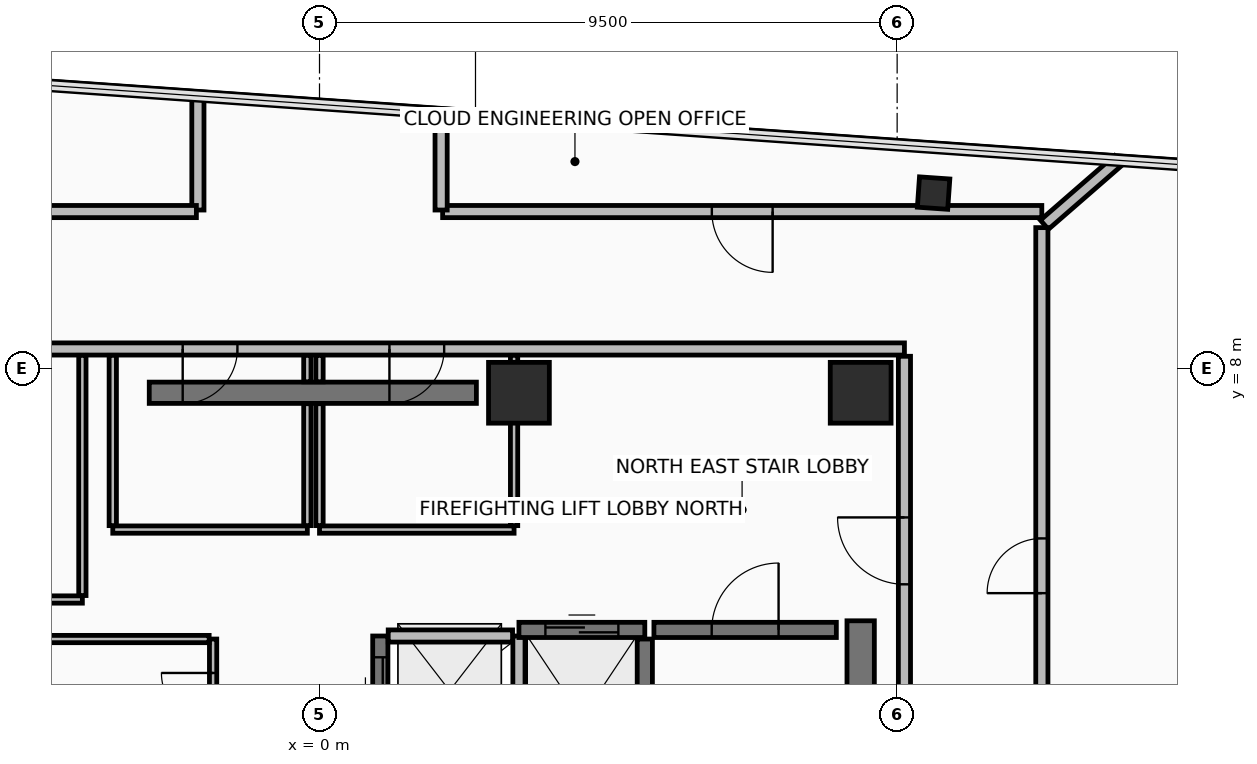
"""IFC4 building model, lengths in metres.
Left out: names, types, materials, properties, quantities, classifications, styles, units other than length and angle.
Written with IfcOpenShell. Run it as: python <this file> out.ifc"""

import sys

from ifc_helpers import new_model, si_unit, direction, frame, frame_2d, origin, origin_2d, place, context, subcontext, project, spatial, rectangle, hollow_rectangle, extrude, element, fill, save


model = new_model("IFC4")
c1 = context("Model", 3, precision=1e-05, world=origin(), true_north=direction((0.0, 1.0)))
c2 = subcontext(c1, "Body", "Model", "MODEL_VIEW")
j1 = project(units=[si_unit("LENGTHUNIT", "METRE"), si_unit("PLANEANGLEUNIT", "RADIAN")], contexts=[c1])
p1 = place(None, origin())
s1 = spatial("IfcSite", under=j1, at=p1, CompositionType="ELEMENT")
p2 = place(p1, origin())
s2 = spatial("IfcBuilding", under=s1, at=p2, CompositionType="ELEMENT")
p3 = place(p2, frame((0.0, 0.0, 248.65)))
s3 = spatial("IfcBuildingStorey", under=s2, at=p3, CompositionType="ELEMENT", Elevation=248.65)
for number, where, z_axis, x_axis in (
    (1, (8.9, 7.6, 0.0), (0.0, 0.0, 1.0), (1.0, 0.0, 0.0)),
    (2, (3.28, 7.6, 0.0), (0.0, 0.0, 1.0), (1.0, 0.0, 0.0)),
):
    element("IfcColumn", number, at=place(p3, frame(where, z_axis=z_axis, x_axis=x_axis)), inside=s3, PredefinedType="COLUMN", context=c2, shape_type="SweptSolid", body=[
        extrude(rectangle(XDim=1.0, YDim=1.0, at=origin_2d()), origin(), (0.0, 0.0, 1.0), 4.75),
    ])
p4 = place(p3, frame((10.1, 10.884, 0.0), z_axis=(0.0, 0.0, 1.0), x_axis=(-0.99756405026, 0.069756473744, 0.0)))
e3 = element("IfcColumn", 3, at=p4, inside=s3, PredefinedType="COLUMN", context=c2, shape_type="SweptSolid", body=[
    extrude(hollow_rectangle(XDim=0.5, YDim=0.5, WallThickness=0.032, at=origin_2d()), origin(), (0.0, 0.0, 1.0), 4.75),
])
p5 = place(p3, frame((-2.8, 7.6, 0.0), z_axis=(0.0, 0.0, 1.0), x_axis=(1.0, 0.0, 0.0)))
e4 = element("IfcWall", 4, at=p5, inside=s3, PredefinedType="SHEAR", context=c2, shape_type="SweptSolid", body=[
    extrude(rectangle(XDim=5.38, YDim=0.35, at=frame_2d((2.69, 0.0))), origin(), (0.0, 0.0, 1.0), 4.56),
])
p6 = place(p3, frame((8.9, -6.85, 0.0), z_axis=(0.0, 0.0, 1.0), x_axis=(0.0, 1.0, 0.0)))
e5 = element("IfcWall", 5, at=p6, inside=s3, PredefinedType="SHEAR", context=c2, shape_type="SweptSolid", body=[
    extrude(rectangle(XDim=10.7, YDim=0.45, at=frame_2d((5.35, 0.0))), origin(), (0.0, 0.0, 1.0), 4.56),
])
p7 = place(p3, frame((9.62, 8.32, 0.0), z_axis=(0.0, 0.0, 1.0), x_axis=(-1.0, 0.0, 0.0)))
e6 = element("IfcWall", 6, at=p7, inside=s3, PredefinedType="PARTITIONING", context=c2, shape_type="SweptSolid", body=[
    extrude(rectangle(XDim=19.24, YDim=0.2, at=frame_2d((9.62, 0.0))), origin(), (0.0, 0.0, 1.0), 2.755),
])
p8 = place(p7, frame((10.97, 0.0, 0.0)))
e7 = element("IfcOpeningElement", 7, at=p8, cuts=e6, PredefinedType="OPENING", context=c2, shape_type="SweptSolid", body=[
    extrude(rectangle(XDim=0.9, YDim=2.1, at=frame_2d((0.45, 1.05))), frame((0.0, 0.11, 0.0), z_axis=(0.0, -1.0, 0.0), x_axis=(1.0, 0.0, 0.0)), (0.0, 0.0, 1.0), 0.22),
])
p9 = place(p7, frame((7.57, 0.0, 0.0)))
e8 = element("IfcOpeningElement", 8, at=p9, cuts=e6, PredefinedType="OPENING", context=c2, shape_type="SweptSolid", body=[
    extrude(rectangle(XDim=0.9, YDim=2.1, at=frame_2d((0.45, 1.05))), frame((0.0, 0.11, 0.0), z_axis=(0.0, -1.0, 0.0), x_axis=(1.0, 0.0, 0.0)), (0.0, 0.0, 1.0), 0.22),
])
p10 = place(p7, frame((16.245, 0.0, 0.0)))
e9 = element("IfcOpeningElement", 9, at=p10, cuts=e6, PredefinedType="OPENING", context=c2, shape_type="SweptSolid", body=[
    extrude(rectangle(XDim=0.9, YDim=2.1, at=frame_2d((0.45, 1.05))), frame((0.0, 0.11, 0.0), z_axis=(0.0, -1.0, 0.0), x_axis=(1.0, 0.0, 0.0)), (0.0, 0.0, 1.0), 0.22),
])
p11 = place(p7, frame((14.295, 0.0, 0.0)))
e10 = element("IfcOpeningElement", 10, at=p11, cuts=e6, PredefinedType="OPENING", context=c2, shape_type="SweptSolid", body=[
    extrude(rectangle(XDim=0.9, YDim=2.1, at=frame_2d((0.45, 1.05))), frame((0.0, 0.11, 0.0), z_axis=(0.0, -1.0, 0.0), x_axis=(1.0, 0.0, 0.0)), (0.0, 0.0, 1.0), 0.22),
])
p12 = place(p3, frame((9.62, -8.2, 0.0), z_axis=(0.0, 0.0, 1.0), x_axis=(0.0, 1.0, 0.0)))
e11 = element("IfcWall", 11, at=p12, inside=s3, PredefinedType="PARTITIONING", context=c2, shape_type="SweptSolid", body=[
    extrude(rectangle(XDim=16.4, YDim=0.2, at=frame_2d((8.2, 0.0))), origin(), (0.0, 0.0, 1.0), 2.355),
])
p13 = place(p12, frame((12.65, 0.0, 0.0)))
e12 = element("IfcOpeningElement", 12, at=p13, cuts=e11, PredefinedType="OPENING", context=c2, shape_type="SweptSolid", body=[
    extrude(rectangle(XDim=1.1, YDim=2.15, at=frame_2d((0.55, 1.075))), frame((0.0, 0.11, 0.0), z_axis=(0.0, -1.0, 0.0), x_axis=(1.0, 0.0, 0.0)), (0.0, 0.0, 1.0), 0.22),
])
p14 = place(p3, frame((5.35, -3.75, 0.0), z_axis=(0.0, 0.0, 1.0), x_axis=(0.0, 1.0, 0.0)))
e13 = element("IfcWall", 13, at=p14, inside=s3, PredefinedType="SHEAR", context=c2, shape_type="SweptSolid", body=[
    extrude(rectangle(XDim=7.3, YDim=0.25, at=frame_2d((3.65, 0.0))), origin(), (0.0, 0.0, 1.0), 4.56),
])
p15 = place(p3, frame((5.5, 3.7, 0.0), z_axis=(0.0, 0.0, 1.0), x_axis=(1.0, 0.0, 0.0)))
e14 = element("IfcWall", 14, at=p15, inside=s3, PredefinedType="SHEAR", context=c2, shape_type="SweptSolid", body=[
    extrude(rectangle(XDim=3.0, YDim=0.25, at=frame_2d((1.5, 0.0))), origin(), (0.0, 0.0, 1.0), 4.56),
])
p16 = place(p15, frame((0.95, 0.0, 0.0)))
e15 = element("IfcOpeningElement", 15, at=p16, cuts=e14, PredefinedType="OPENING", context=c2, shape_type="SweptSolid", body=[
    extrude(rectangle(XDim=1.1, YDim=2.15, at=frame_2d((0.55, 1.075))), frame((0.0, 0.135, 0.0), z_axis=(0.0, -1.0, 0.0), x_axis=(1.0, 0.0, 0.0)), (0.0, 0.0, 1.0), 0.27),
])
p17 = place(p3, frame((1.0, 1.8, 0.0), z_axis=(0.0, 0.0, 1.0), x_axis=(0.0, 1.0, 0.0)))
e16 = element("IfcWall", 16, at=p17, inside=s3, PredefinedType="SHEAR", context=c2, shape_type="SweptSolid", body=[
    extrude(rectangle(XDim=1.8, YDim=0.25, at=frame_2d((0.9, 0.0))), origin(), (0.0, 0.0, 1.0), 4.56),
])
p18 = place(p17, frame((0.35, 0.0, 0.0)))
e17 = element("IfcOpeningElement", 17, at=p18, cuts=e16, PredefinedType="OPENING", context=c2, shape_type="SweptSolid", body=[
    extrude(rectangle(XDim=1.1, YDim=2.2, at=frame_2d((0.55, 1.1))), frame((0.0, 0.135, 0.0), z_axis=(0.0, -1.0, 0.0), x_axis=(1.0, 0.0, 0.0)), (0.0, 0.0, 1.0), 0.27),
])
p19 = place(p3, frame((3.28, 1.8, 0.0), z_axis=(0.0, 0.0, 1.0), x_axis=(0.0, 1.0, 0.0)))
e18 = element("IfcWall", 18, at=p19, inside=s3, PredefinedType="PARTITIONING", context=c2, shape_type="SweptSolid", body=[
    extrude(rectangle(XDim=1.8, YDim=0.2, at=frame_2d((0.9, 0.0))), origin(), (0.0, 0.0, 1.0), 4.56),
])
p20 = place(p3, frame((1.13, 3.6, 0.0), z_axis=(0.0, 0.0, 1.0), x_axis=(1.0, 0.0, 0.0)))
e19 = element("IfcWall", 19, at=p20, inside=s3, PredefinedType="PARTITIONING", context=c2, shape_type="SweptSolid", body=[
    extrude(rectangle(XDim=2.045, YDim=0.2, at=frame_2d((1.022, 0.0))), origin(), (0.0, 0.0, 1.0), 3.855),
])
p21 = place(p3, frame((3.28, 3.7, 0.0), z_axis=(0.0, 0.0, 1.0), x_axis=(1.0, 0.0, 0.0)))
e20 = element("IfcWall", 20, at=p21, inside=s3, PredefinedType="SHEAR", context=c2, shape_type="SweptSolid", body=[
    extrude(rectangle(XDim=2.07, YDim=0.25, at=frame_2d((1.035, 0.0))), origin(), (0.0, 0.0, 1.0), 4.56),
])
p22 = place(p21, frame((0.435, 0.0, 0.0)))
e21 = element("IfcOpeningElement", 21, at=p22, cuts=e20, PredefinedType="OPENING", context=c2, shape_type="SweptSolid", body=[
    extrude(rectangle(XDim=1.2, YDim=2.2, at=frame_2d((0.6, 1.1))), frame((0.0, 0.135, 0.0), z_axis=(0.0, -1.0, 0.0), x_axis=(1.0, 0.0, 0.0)), (0.0, 0.0, 1.0), 0.27),
])
p23 = place(p3, frame((-1.75, 1.585, 0.0), z_axis=(0.0, 0.0, 1.0), x_axis=(0.0, 1.0, 0.0)))
e22 = element("IfcWall", 22, at=p23, inside=s3, PredefinedType="PARTITIONING", context=c2, shape_type="SweptSolid", body=[
    extrude(rectangle(XDim=1.965, YDim=0.12, at=frame_2d((0.982, 0.0))), origin(), (0.0, 0.0, 1.0), 4.56),
])
p24 = place(p23, frame((0.557, 0.0, 0.0)))
e23 = element("IfcOpeningElement", 23, at=p24, cuts=e22, PredefinedType="OPENING", context=c2, shape_type="SweptSolid", body=[
    extrude(rectangle(XDim=0.85, YDim=2.1, at=frame_2d((0.425, 1.05))), frame((0.0, 0.07, 0.0), z_axis=(0.0, -1.0, 0.0), x_axis=(1.0, 0.0, 0.0)), (0.0, 0.0, 1.0), 0.14),
])
p25 = place(p3, frame((-1.815, 3.55, 0.0), z_axis=(0.0, 0.0, 1.0), x_axis=(-1.0, 0.0, 0.0)))
e24 = element("IfcWall", 24, at=p25, inside=s3, PredefinedType="PARTITIONING", context=c2, shape_type="SweptSolid", body=[
    extrude(rectangle(XDim=3.405, YDim=0.12, at=frame_2d((1.703, 0.0))), origin(), (0.0, 0.0, 1.0), 4.56),
])
p26 = place(p3, frame((-3.4, 5.35, 0.0), z_axis=(0.0, 0.0, 1.0), x_axis=(1.0, 0.0, 0.0)))
e25 = element("IfcWall", 25, at=p26, inside=s3, PredefinedType="PARTITIONING", context=c2, shape_type="SweptSolid", body=[
    extrude(rectangle(XDim=3.2, YDim=0.12, at=frame_2d((1.6, 0.0))), origin(), (0.0, 0.0, 1.0), 4.56),
])
p27 = place(p3, frame((-0.2, 5.415, 0.0), z_axis=(0.0, 0.0, 1.0), x_axis=(0.0, 1.0, 0.0)))
e26 = element("IfcWall", 26, at=p27, inside=s3, PredefinedType="PARTITIONING", context=c2, shape_type="SweptSolid", body=[
    extrude(rectangle(XDim=2.005, YDim=0.12, at=frame_2d((1.002, 0.0))), origin(), (0.0, 0.0, 1.0), 3.855),
])
p28 = place(p3, frame((-0.2, 7.78, 0.0), z_axis=(0.0, 0.0, 1.0), x_axis=(0.0, 1.0, 0.0)))
e27 = element("IfcWall", 27, at=p28, inside=s3, PredefinedType="PARTITIONING", context=c2, shape_type="SweptSolid", body=[
    extrude(rectangle(XDim=0.435, YDim=0.12, at=frame_2d((0.218, 0.0))), origin(), (0.0, 0.0, 1.0), 3.855),
])
p29 = place(p3, frame((-3.4, 8.215, 0.0), z_axis=(0.0, 0.0, 1.0), x_axis=(0.0, -1.0, 0.0)))
e28 = element("IfcWall", 28, at=p29, inside=s3, PredefinedType="PARTITIONING", context=c2, shape_type="SweptSolid", body=[
    extrude(rectangle(XDim=2.8, YDim=0.12, at=frame_2d((1.4, 0.0))), origin(), (0.0, 0.0, 1.0), 3.855),
])
p30 = place(p3, frame((0.0, 5.35, 0.0), z_axis=(0.0, 0.0, 1.0), x_axis=(1.0, 0.0, 0.0)))
e29 = element("IfcWall", 29, at=p30, inside=s3, PredefinedType="PARTITIONING", context=c2, shape_type="SweptSolid", body=[
    extrude(rectangle(XDim=3.2, YDim=0.12, at=frame_2d((1.6, 0.0))), origin(), (0.0, 0.0, 1.0), 3.855),
])
p31 = place(p3, frame((3.2, 5.415, 0.0), z_axis=(0.0, 0.0, 1.0), x_axis=(0.0, 1.0, 0.0)))
e30 = element("IfcWall", 30, at=p31, inside=s3, PredefinedType="PARTITIONING", context=c2, shape_type="SweptSolid", body=[
    extrude(rectangle(XDim=2.8, YDim=0.12, at=frame_2d((1.4, 0.0))), origin(), (0.0, 0.0, 1.0), 3.855),
])
p32 = place(p3, frame((0.0, 8.215, 0.0), z_axis=(0.0, 0.0, 1.0), x_axis=(0.0, -1.0, 0.0)))
e31 = element("IfcWall", 31, at=p32, inside=s3, PredefinedType="PARTITIONING", context=c2, shape_type="SweptSolid", body=[
    extrude(rectangle(XDim=0.435, YDim=0.12, at=frame_2d((0.218, 0.0))), origin(), (0.0, 0.0, 1.0), 3.855),
])
p33 = place(p3, frame((0.0, 7.42, 0.0), z_axis=(0.0, 0.0, 1.0), x_axis=(0.0, -1.0, 0.0)))
e32 = element("IfcWall", 32, at=p33, inside=s3, PredefinedType="PARTITIONING", context=c2, shape_type="SweptSolid", body=[
    extrude(rectangle(XDim=2.005, YDim=0.12, at=frame_2d((1.002, 0.0))), origin(), (0.0, 0.0, 1.0), 3.855),
])
p34 = place(p3, frame((-6.35, 4.2, 0.0), z_axis=(0.0, 0.0, 1.0), x_axis=(1.0, 0.0, 0.0)))
e33 = element("IfcWall", 33, at=p34, inside=s3, PredefinedType="PARTITIONING", context=c2, shape_type="SweptSolid", body=[
    extrude(rectangle(XDim=2.45, YDim=0.12, at=frame_2d((1.225, 0.0))), origin(), (0.0, 0.0, 1.0), 4.56),
])
p35 = place(p3, frame((-3.9, 4.265, 0.0), z_axis=(0.0, 0.0, 1.0), x_axis=(0.0, 1.0, 0.0)))
e34 = element("IfcWall", 34, at=p35, inside=s3, PredefinedType="PARTITIONING", context=c2, shape_type="SweptSolid", body=[
    extrude(rectangle(XDim=3.95, YDim=0.12, at=frame_2d((1.975, 0.0))), origin(), (0.0, 0.0, 1.0), 3.855),
])
p36 = place(p3, frame((13.14, 11.423, 0.0), z_axis=(0.0, 0.0, 1.0), x_axis=(-0.754660835824, -0.6561150988, 0.0)))
e35 = element("IfcWall", 35, at=p36, inside=s3, PredefinedType="PARTITIONING", context=c2, shape_type="SweptSolid", body=[
    extrude(rectangle(XDim=1.615, YDim=0.2, at=frame_2d((0.808, 0.0))), origin(), (0.0, 0.0, 1.0), 2.255),
])
p37 = place(p3, frame((11.879, 10.58, 0.0), z_axis=(0.0, 0.0, 1.0), x_axis=(-1.0, 0.0, 0.0)))
e36 = element("IfcWall", 36, at=p37, inside=s3, PredefinedType="PARTITIONING", context=c2, shape_type="SweptSolid", body=[
    extrude(rectangle(XDim=9.854, YDim=0.2, at=frame_2d((4.927, 0.0))), origin(), (0.0, 0.0, 1.0), 2.255),
])
p38 = place(p37, frame((4.427, 0.0, 0.0)))
e37 = element("IfcOpeningElement", 37, at=p38, cuts=e36, PredefinedType="OPENING", context=c2, shape_type="SweptSolid", body=[
    extrude(rectangle(XDim=1.0, YDim=2.15, at=frame_2d((0.5, 1.075))), frame((0.0, 0.11, 0.0), z_axis=(0.0, -1.0, 0.0), x_axis=(1.0, 0.0, 0.0)), (0.0, 0.0, 1.0), 0.22),
])
p39 = place(p3, frame((2.0, 10.605, 0.0), z_axis=(0.0, 0.0, 1.0), x_axis=(0.0, 1.0, 0.0)))
e38 = element("IfcWall", 38, at=p39, inside=s3, PredefinedType="PARTITIONING", context=c2, shape_type="SweptSolid", body=[
    extrude(rectangle(XDim=1.597, YDim=0.2, at=frame_2d((0.798, 0.0))), origin(), (0.0, 0.0, 1.0), 2.255),
])
p40 = place(p3, frame((-2.0, 12.482, 0.0), z_axis=(0.0, 0.0, 1.0), x_axis=(0.0, -1.0, 0.0)))
e39 = element("IfcWall", 39, at=p40, inside=s3, PredefinedType="PARTITIONING", context=c2, shape_type="SweptSolid", body=[
    extrude(rectangle(XDim=1.877, YDim=0.2, at=frame_2d((0.938, 0.0))), origin(), (0.0, 0.0, 1.0), 2.255),
])
p41 = place(p3, frame((-2.025, 10.58, 0.0), z_axis=(0.0, 0.0, 1.0), x_axis=(-1.0, 0.0, 0.0)))
e40 = element("IfcWall", 40, at=p41, inside=s3, PredefinedType="PARTITIONING", context=c2, shape_type="SweptSolid", body=[
    extrude(rectangle(XDim=9.854, YDim=0.2, at=frame_2d((4.927, 0.0))), origin(), (0.0, 0.0, 1.0), 2.755),
])
p42 = place(p41, frame((4.327, 0.0, 0.0)))
e41 = element("IfcOpeningElement", 41, at=p42, cuts=e40, PredefinedType="OPENING", context=c2, shape_type="SweptSolid", body=[
    extrude(rectangle(XDim=1.2, YDim=2.15, at=frame_2d((0.6, 1.075))), frame((0.0, 0.11, 0.0), z_axis=(0.0, -1.0, 0.0), x_axis=(1.0, 0.0, 0.0)), (0.0, 0.0, 1.0), 0.22),
])
p43 = place(p3, frame((11.88, -0.807, 0.0), z_axis=(0.0, 0.0, 1.0), x_axis=(0.0, 1.0, 0.0)))
e42 = element("IfcWall", 42, at=p43, inside=s3, PredefinedType="PARTITIONING", context=c2, shape_type="SweptSolid", body=[
    extrude(rectangle(XDim=11.123, YDim=0.2, at=frame_2d((5.562, 0.0))), origin(), (0.0, 0.0, 1.0), 2.255),
])
p44 = place(p43, frame((5.112, 0.0, 0.0)))
e43 = element("IfcOpeningElement", 43, at=p44, cuts=e42, PredefinedType="OPENING", context=c2, shape_type="SweptSolid", body=[
    extrude(rectangle(XDim=0.9, YDim=2.1, at=frame_2d((0.45, 1.05))), frame((0.0, 0.11, 0.0), z_axis=(0.0, -1.0, 0.0), x_axis=(1.0, 0.0, 0.0)), (0.0, 0.0, 1.0), 0.22),
])
p45 = place(p13, frame((1.1, 0.0, 0.0), z_axis=(0.0, 0.0, 1.0), x_axis=(-1.0, 0.0, 0.0)))
e44 = element("IfcDoor", 44, at=p45, inside=s3, OperationType="SINGLE_SWING_LEFT", PredefinedType="DOOR", context=c2, shape_type="SweptSolid", body=[
    extrude(rectangle(XDim=1.1, YDim=2.15, at=frame_2d((0.55, 1.075))), frame((0.0, 0.025, 0.0), z_axis=(0.0, -1.0, 0.0), x_axis=(1.0, 0.0, 0.0)), (0.0, 0.0, 1.0), 0.05),
])
fill(e12, e44)
p46 = place(p16, frame((1.1, 0.0, 0.0), z_axis=(0.0, 0.0, 1.0), x_axis=(-1.0, 0.0, 0.0)))
e45 = element("IfcDoor", 45, at=p46, inside=s3, OperationType="SINGLE_SWING_LEFT", PredefinedType="DOOR", context=c2, shape_type="SweptSolid", body=[
    extrude(rectangle(XDim=1.1, YDim=2.15, at=frame_2d((0.55, 1.075))), frame((0.0, 0.025, 0.0), z_axis=(0.0, -1.0, 0.0), x_axis=(1.0, 0.0, 0.0)), (0.0, 0.0, 1.0), 0.05),
])
fill(e15, e45)
p47 = place(p18, origin())
e46 = element("IfcDoor", 46, at=p47, inside=s3, OperationType="SLIDING_TO_LEFT", PredefinedType="DOOR", context=c2, shape_type="SweptSolid", body=[
    extrude(rectangle(XDim=1.1, YDim=2.2, at=frame_2d((0.55, 1.1))), frame((0.0, 0.025, 0.0), z_axis=(0.0, -1.0, 0.0), x_axis=(1.0, 0.0, 0.0)), (0.0, 0.0, 1.0), 0.05),
])
fill(e17, e46)
p48 = place(p22, origin())
e47 = element("IfcDoor", 47, at=p48, inside=s3, OperationType="SLIDING_TO_RIGHT", PredefinedType="DOOR", context=c2, shape_type="SweptSolid", body=[
    extrude(rectangle(XDim=1.2, YDim=2.2, at=frame_2d((0.6, 1.1))), frame((0.0, 0.025, 0.0), z_axis=(0.0, -1.0, 0.0), x_axis=(1.0, 0.0, 0.0)), (0.0, 0.0, 1.0), 0.05),
])
fill(e21, e47)
p49 = place(p24, frame((0.85, 0.0, 0.0), z_axis=(0.0, 0.0, 1.0), x_axis=(-1.0, 0.0, 0.0)))
e48 = element("IfcDoor", 48, at=p49, inside=s3, OperationType="SINGLE_SWING_RIGHT", PredefinedType="DOOR", context=c2, shape_type="SweptSolid", body=[
    extrude(rectangle(XDim=0.85, YDim=2.1, at=frame_2d((0.425, 1.05))), frame((0.0, 0.025, 0.0), z_axis=(0.0, -1.0, 0.0), x_axis=(1.0, 0.0, 0.0)), (0.0, 0.0, 1.0), 0.05),
])
fill(e23, e48)
p50 = place(p8, frame((0.9, 0.0, 0.0), z_axis=(0.0, 0.0, 1.0), x_axis=(-1.0, 0.0, 0.0)))
e49 = element("IfcDoor", 49, at=p50, inside=s3, OperationType="SINGLE_SWING_LEFT", PredefinedType="DOOR", context=c2, shape_type="SweptSolid", body=[
    extrude(rectangle(XDim=0.9, YDim=2.1, at=frame_2d((0.45, 1.05))), frame((0.0, 0.025, 0.0), z_axis=(0.0, -1.0, 0.0), x_axis=(1.0, 0.0, 0.0)), (0.0, 0.0, 1.0), 0.05),
])
fill(e7, e49)
p51 = place(p9, frame((0.9, 0.0, 0.0), z_axis=(0.0, 0.0, 1.0), x_axis=(-1.0, 0.0, 0.0)))
e50 = element("IfcDoor", 50, at=p51, inside=s3, OperationType="SINGLE_SWING_LEFT", PredefinedType="DOOR", context=c2, shape_type="SweptSolid", body=[
    extrude(rectangle(XDim=0.9, YDim=2.1, at=frame_2d((0.45, 1.05))), frame((0.0, 0.025, 0.0), z_axis=(0.0, -1.0, 0.0), x_axis=(1.0, 0.0, 0.0)), (0.0, 0.0, 1.0), 0.05),
])
fill(e8, e50)
p52 = place(p38, origin())
e51 = element("IfcDoor", 51, at=p52, inside=s3, OperationType="SINGLE_SWING_RIGHT", PredefinedType="DOOR", context=c2, shape_type="SweptSolid", body=[
    extrude(rectangle(XDim=1.0, YDim=2.15, at=frame_2d((0.5, 1.075))), frame((0.0, 0.025, 0.0), z_axis=(0.0, -1.0, 0.0), x_axis=(1.0, 0.0, 0.0)), (0.0, 0.0, 1.0), 0.05),
])
fill(e37, e51)
p53 = place(p44, origin())
e52 = element("IfcDoor", 52, at=p53, inside=s3, OperationType="SINGLE_SWING_LEFT", PredefinedType="DOOR", context=c2, shape_type="SweptSolid", body=[
    extrude(rectangle(XDim=0.9, YDim=2.1, at=frame_2d((0.45, 1.05))), frame((0.0, 0.025, 0.0), z_axis=(0.0, -1.0, 0.0), x_axis=(1.0, 0.0, 0.0)), (0.0, 0.0, 1.0), 0.05),
])
fill(e43, e52)
save(model, sys.argv[1])
